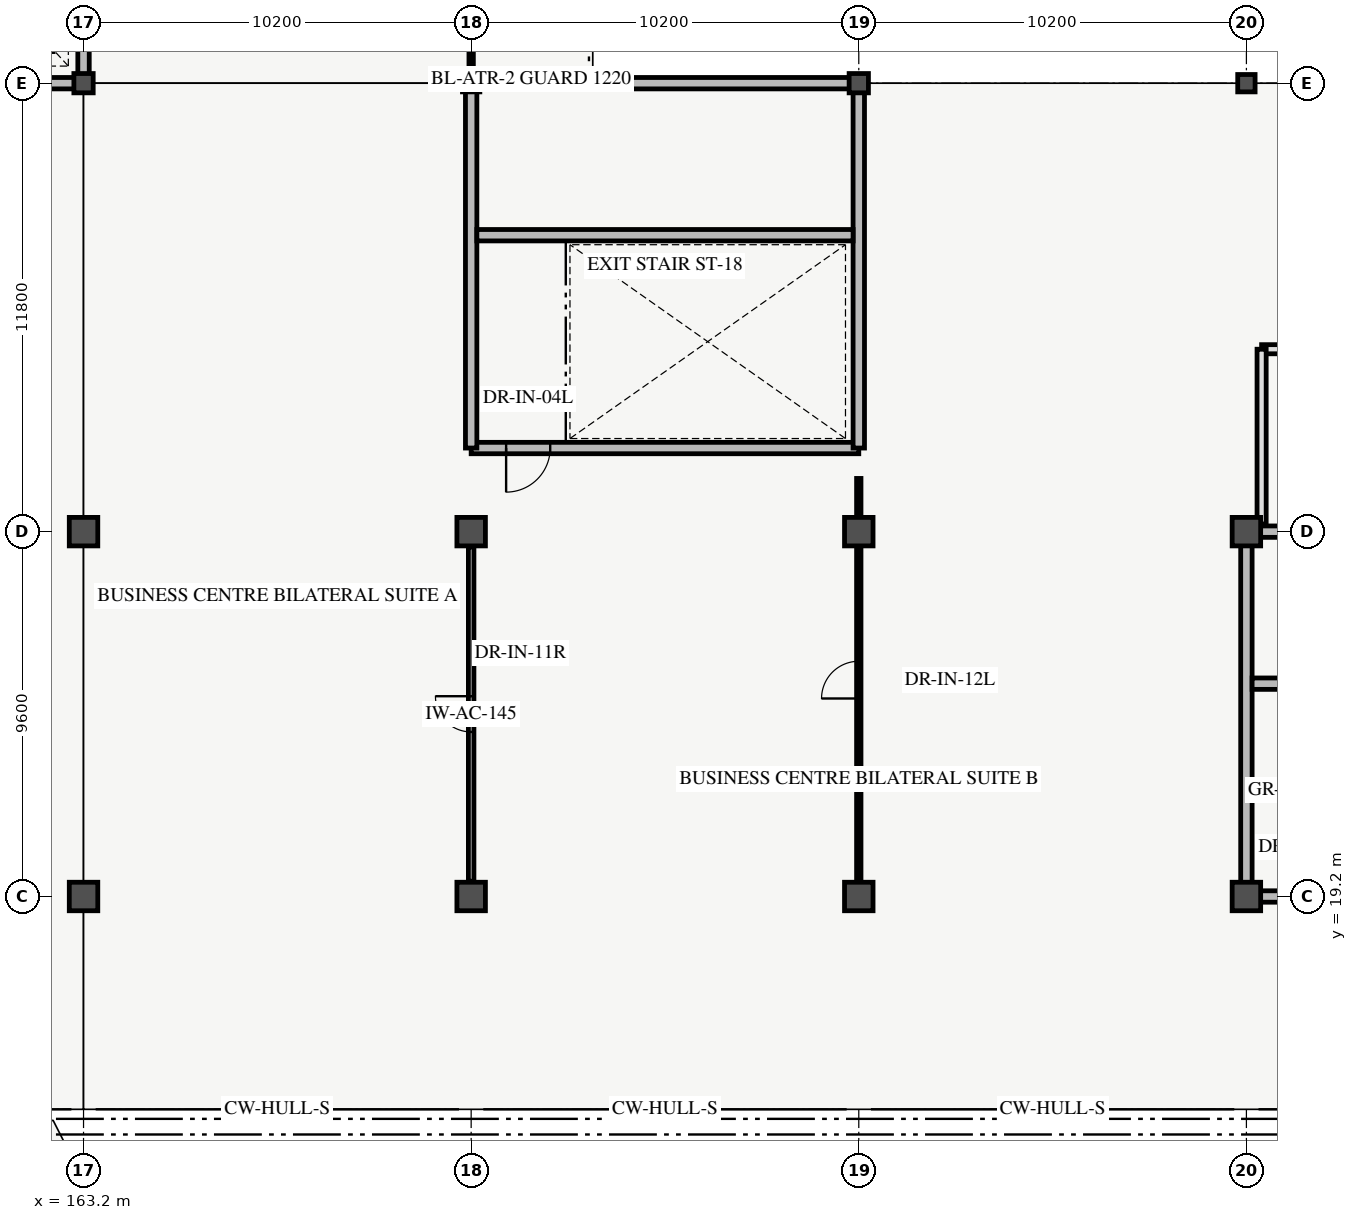
"""IFC4 building model, lengths in metres.
Left out: names, types, materials, properties, quantities, classifications, styles, units other than length and angle.
Written with IfcOpenShell. Run it as: python <this file> out.ifc"""

import sys

from ifc_helpers import new_model, si_unit, direction, frame, frame_2d, origin, origin_2d, place, context, subcontext, project, spatial, rectangle, hollow_circle, extrude, element, fill, save


model = new_model("IFC4")
c1 = context("Model", 3, precision=1e-05, world=origin(), true_north=direction((0.0, 1.0)))
c2 = subcontext(c1, "Body", "Model", "MODEL_VIEW")
j1 = project(units=[si_unit("LENGTHUNIT", "METRE"), si_unit("PLANEANGLEUNIT", "RADIAN")], contexts=[c1])
p1 = place(None, origin())
s1 = spatial("IfcSite", under=j1, at=p1, CompositionType="ELEMENT")
p2 = place(p1, origin())
s2 = spatial("IfcBuilding", under=s1, at=p2, CompositionType="ELEMENT")
p3 = place(p2, frame((0.0, 0.0, 10.8)))
s3 = spatial("IfcBuildingStorey", under=s2, at=p3, CompositionType="ELEMENT", Elevation=10.8)
for number, where, z_axis, x_axis in (
    (1, (163.2, 19.2, 0.0), (0.0, 0.0, 1.0), (1.0, 0.0, 0.0)),
    (2, (163.2, 28.8, 0.0), (0.0, 0.0, 1.0), (1.0, 0.0, 0.0)),
):
    element("IfcColumn", number, at=place(p3, frame(where, z_axis=z_axis, x_axis=x_axis)), inside=s3, PredefinedType="COLUMN", context=c2, shape_type="SweptSolid", body=[
        extrude(rectangle(XDim=0.75, YDim=0.75, at=origin_2d()), origin(), (0.0, 0.0, 1.0), 4.2),
    ])
p4 = place(p3, frame((163.2, 40.6, 0.0), z_axis=(0.0, 0.0, 1.0), x_axis=(1.0, 0.0, 0.0)))
e3 = element("IfcColumn", 3, at=p4, inside=s3, PredefinedType="COLUMN", context=c2, shape_type="SweptSolid", body=[
    extrude(hollow_circle(Radius=0.254, WallThickness=0.02, at=origin_2d()), origin(), (0.0, 0.0, 1.0), 4.2),
])
for number, where, z_axis, x_axis in (
    (4, (173.4, 19.2, 0.0), (0.0, 0.0, 1.0), (1.0, 0.0, 0.0)),
    (5, (173.4, 28.8, 0.0), (0.0, 0.0, 1.0), (1.0, 0.0, 0.0)),
):
    element("IfcColumn", number, at=place(p3, frame(where, z_axis=z_axis, x_axis=x_axis)), inside=s3, PredefinedType="COLUMN", context=c2, shape_type="SweptSolid", body=[
        extrude(rectangle(XDim=0.75, YDim=0.75, at=origin_2d()), origin(), (0.0, 0.0, 1.0), 4.2),
    ])
p5 = place(p3, frame((173.4, 40.6, 0.0), z_axis=(0.0, 0.0, 1.0), x_axis=(1.0, 0.0, 0.0)))
e6 = element("IfcColumn", 6, at=p5, inside=s3, PredefinedType="COLUMN", context=c2, shape_type="SweptSolid", body=[
    extrude(hollow_circle(Radius=0.229, WallThickness=0.02, at=origin_2d()), origin(), (0.0, 0.0, 1.0), 4.2),
])
for number, where, z_axis, x_axis in (
    (7, (183.6, 19.2, 0.0), (0.0, 0.0, 1.0), (1.0, 0.0, 0.0)),
    (8, (183.6, 28.8, 0.0), (0.0, 0.0, 1.0), (1.0, 0.0, 0.0)),
):
    element("IfcColumn", number, at=place(p3, frame(where, z_axis=z_axis, x_axis=x_axis)), inside=s3, PredefinedType="COLUMN", context=c2, shape_type="SweptSolid", body=[
        extrude(rectangle(XDim=0.75, YDim=0.75, at=origin_2d()), origin(), (0.0, 0.0, 1.0), 4.2),
    ])
p6 = place(p3, frame((183.6, 40.6, 0.0), z_axis=(0.0, 0.0, 1.0), x_axis=(1.0, 0.0, 0.0)))
e9 = element("IfcColumn", 9, at=p6, inside=s3, PredefinedType="COLUMN", context=c2, shape_type="SweptSolid", body=[
    extrude(hollow_circle(Radius=0.254, WallThickness=0.02, at=origin_2d()), origin(), (0.0, 0.0, 1.0), 4.2),
])
for number, where, z_axis, x_axis in (
    (10, (193.8, 19.2, 0.0), (0.0, 0.0, 1.0), (1.0, 0.0, 0.0)),
    (11, (193.8, 28.8, 0.0), (0.0, 0.0, 1.0), (1.0, 0.0, 0.0)),
):
    element("IfcColumn", number, at=place(p3, frame(where, z_axis=z_axis, x_axis=x_axis)), inside=s3, PredefinedType="COLUMN", context=c2, shape_type="SweptSolid", body=[
        extrude(rectangle(XDim=0.75, YDim=0.75, at=origin_2d()), origin(), (0.0, 0.0, 1.0), 4.2),
    ])
p7 = place(p3, frame((193.8, 40.6, 0.0), z_axis=(0.0, 0.0, 1.0), x_axis=(1.0, 0.0, 0.0)))
e12 = element("IfcColumn", 12, at=p7, inside=s3, PredefinedType="COLUMN", context=c2, shape_type="SweptSolid", body=[
    extrude(hollow_circle(Radius=0.229, WallThickness=0.02, at=origin_2d()), origin(), (0.0, 0.0, 1.0), 4.2),
])
p8 = place(p3, frame((153.0, 40.6, 0.0), z_axis=(0.0, 0.0, 1.0), x_axis=(1.0, 0.0, 0.0)))
e13 = element("IfcWall", 13, at=p8, inside=s3, PredefinedType="SHEAR", context=c2, shape_type="SweptSolid", body=[
    extrude(rectangle(XDim=10.2, YDim=0.3, at=frame_2d((5.1, 0.0))), origin(), (0.0, 0.0, 1.0), 4.2),
])
p9 = place(p8, frame((7.4, 0.0, 0.0)))
e14 = element("IfcOpeningElement", 14, at=p9, cuts=e13, PredefinedType="OPENING", context=c2, shape_type="SweptSolid", body=[
    extrude(rectangle(XDim=1.2, YDim=2.25, at=frame_2d((0.6, 1.125))), frame((0.0, 0.16, 0.0), z_axis=(0.0, -1.0, 0.0), x_axis=(1.0, 0.0, 0.0)), (0.0, 0.0, 1.0), 0.32),
])
p10 = place(p3, frame((163.2, 40.6, 0.0), z_axis=(0.0, 0.0, 1.0), x_axis=(0.0, 1.0, 0.0)))
e15 = element("IfcWall", 15, at=p10, inside=s3, PredefinedType="SHEAR", context=c2, shape_type="SweptSolid", body=[
    extrude(rectangle(XDim=11.8, YDim=0.3, at=frame_2d((5.9, 0.0))), origin(), (0.0, 0.0, 1.0), 4.2),
])
p11 = place(p3, frame((193.8, 19.2, 0.0), z_axis=(0.0, 0.0, 1.0), x_axis=(1.0, 0.0, 0.0)))
e16 = element("IfcWall", 16, at=p11, inside=s3, PredefinedType="SHEAR", context=c2, shape_type="SweptSolid", body=[
    extrude(rectangle(XDim=10.2, YDim=0.3, at=frame_2d((5.1, 0.0))), origin(), (0.0, 0.0, 1.0), 4.2),
])
p12 = place(p11, frame((0.92, 0.0, 0.0)))
e17 = element("IfcOpeningElement", 17, at=p12, cuts=e16, PredefinedType="OPENING", context=c2, shape_type="SweptSolid", body=[
    extrude(rectangle(XDim=1.16, YDim=2.2, at=frame_2d((0.58, 1.1))), frame((0.0, 0.16, 0.0), z_axis=(0.0, -1.0, 0.0), x_axis=(1.0, 0.0, 0.0)), (0.0, 0.0, 1.0), 0.32),
])
p13 = place(p3, frame((193.8, 28.8, 0.0), z_axis=(0.0, 0.0, 1.0), x_axis=(1.0, 0.0, 0.0)))
e18 = element("IfcWall", 18, at=p13, inside=s3, PredefinedType="SHEAR", context=c2, shape_type="SweptSolid", body=[
    extrude(rectangle(XDim=10.2, YDim=0.3, at=frame_2d((5.1, 0.0))), origin(), (0.0, 0.0, 1.0), 4.2),
])
p14 = place(p13, frame((7.4, 0.0, 0.0)))
e19 = element("IfcOpeningElement", 19, at=p14, cuts=e18, PredefinedType="OPENING", context=c2, shape_type="SweptSolid", body=[
    extrude(rectangle(XDim=1.2, YDim=2.25, at=frame_2d((0.6, 1.125))), frame((0.0, 0.16, 0.0), z_axis=(0.0, -1.0, 0.0), x_axis=(1.0, 0.0, 0.0)), (0.0, 0.0, 1.0), 0.32),
])
p15 = place(p3, frame((193.8, 19.2, 0.0), z_axis=(0.0, 0.0, 1.0), x_axis=(0.0, 1.0, 0.0)))
e20 = element("IfcWall", 20, at=p15, inside=s3, PredefinedType="SHEAR", context=c2, shape_type="SweptSolid", body=[
    extrude(rectangle(XDim=9.6, YDim=0.3, at=frame_2d((4.8, 0.0))), origin(), (0.0, 0.0, 1.0), 4.2),
])
p16 = place(p3, frame((193.95, 24.8, 0.0), z_axis=(0.0, 0.0, 1.0), x_axis=(1.0, 0.0, 0.0)))
e21 = element("IfcWall", 21, at=p16, inside=s3, PredefinedType="SHEAR", context=c2, shape_type="SweptSolid", body=[
    extrude(rectangle(XDim=9.9, YDim=0.3, at=frame_2d((4.95, 0.0))), origin(), (0.0, 0.0, 1.0), 4.2),
])
p17 = place(p3, frame((173.4, 31.0, 0.0), z_axis=(0.0, 0.0, 1.0), x_axis=(1.0, 0.0, 0.0)))
e22 = element("IfcWall", 22, at=p17, inside=s3, PredefinedType="SHEAR", context=c2, shape_type="SweptSolid", body=[
    extrude(rectangle(XDim=10.2, YDim=0.3, at=frame_2d((5.1, 0.0))), origin(), (0.0, 0.0, 1.0), 4.2),
])
p18 = place(p17, frame((0.92, 0.0, 0.0)))
e23 = element("IfcOpeningElement", 23, at=p18, cuts=e22, PredefinedType="OPENING", context=c2, shape_type="SweptSolid", body=[
    extrude(rectangle(XDim=1.16, YDim=2.2, at=frame_2d((0.58, 1.1))), frame((0.0, 0.16, 0.0), z_axis=(0.0, -1.0, 0.0), x_axis=(1.0, 0.0, 0.0)), (0.0, 0.0, 1.0), 0.32),
])
p19 = place(p3, frame((173.4, 40.6, 0.0), z_axis=(0.0, 0.0, 1.0), x_axis=(1.0, 0.0, 0.0)))
e24 = element("IfcWall", 24, at=p19, inside=s3, PredefinedType="SHEAR", context=c2, shape_type="SweptSolid", body=[
    extrude(rectangle(XDim=10.2, YDim=0.3, at=frame_2d((5.1, 0.0))), origin(), (0.0, 0.0, 1.0), 4.2),
])
for number, where, z_axis, x_axis in (
    (25, (173.4, 31.0, 0.0), (0.0, 0.0, 1.0), (0.0, 1.0, 0.0)),
    (26, (183.6, 31.0, 0.0), (0.0, 0.0, 1.0), (0.0, 1.0, 0.0)),
):
    element("IfcWall", number, at=place(p3, frame(where, z_axis=z_axis, x_axis=x_axis)), inside=s3, PredefinedType="SHEAR", context=c2, shape_type="SweptSolid", body=[
        extrude(rectangle(XDim=9.6, YDim=0.3, at=frame_2d((4.8, 0.0))), origin(), (0.0, 0.0, 1.0), 4.2),
    ])
p20 = place(p3, frame((173.55, 36.6, 0.0), z_axis=(0.0, 0.0, 1.0), x_axis=(1.0, 0.0, 0.0)))
e27 = element("IfcWall", 27, at=p20, inside=s3, PredefinedType="SHEAR", context=c2, shape_type="SweptSolid", body=[
    extrude(rectangle(XDim=9.9, YDim=0.3, at=frame_2d((4.95, 0.0))), origin(), (0.0, 0.0, 1.0), 4.2),
])
p21 = place(p3, frame((194.2, 33.6, 0.0), z_axis=(0.0, 0.0, 1.0), x_axis=(1.0, 0.0, 0.0)))
e28 = element("IfcWall", 28, at=p21, inside=s3, PredefinedType="PARTITIONING", context=c2, shape_type="SweptSolid", body=[
    extrude(rectangle(XDim=9.4, YDim=0.24, at=frame_2d((4.7, 0.0))), origin(), (0.0, 0.0, 1.0), 3.06),
])
p22 = place(p21, frame((3.75, 0.0, 0.0)))
e29 = element("IfcOpeningElement", 29, at=p22, cuts=e28, PredefinedType="OPENING", context=c2, shape_type="SweptSolid", body=[
    extrude(rectangle(XDim=1.9, YDim=2.25, at=frame_2d((0.95, 1.125))), frame((0.0, 0.13, 0.0), z_axis=(0.0, -1.0, 0.0), x_axis=(1.0, 0.0, 0.0)), (0.0, 0.0, 1.0), 0.26),
])
p23 = place(p3, frame((194.2, 29.0, 0.0), z_axis=(0.0, 0.0, 1.0), x_axis=(0.0, 1.0, 0.0)))
e30 = element("IfcWall", 30, at=p23, inside=s3, PredefinedType="PARTITIONING", context=c2, shape_type="SweptSolid", body=[
    extrude(rectangle(XDim=4.6, YDim=0.24, at=frame_2d((2.3, 0.0))), origin(), (0.0, 0.0, 1.0), 3.06),
])
p24 = place(p3, frame((173.4, 41.0, 0.0), z_axis=(0.0, 0.0, 1.0), x_axis=(0.0, 1.0, 0.0)))
e31 = element("IfcWall", 31, at=p24, inside=s3, PredefinedType="PARTITIONING", context=c2, shape_type="SweptSolid", body=[
    extrude(rectangle(XDim=11.0, YDim=0.115, at=frame_2d((5.5, 0.0))), origin(), (0.0, 0.0, 1.0), 3.06),
])
p25 = place(p24, frame((4.3, 0.0, 0.0)))
e32 = element("IfcOpeningElement", 32, at=p25, cuts=e31, PredefinedType="OPENING", context=c2, shape_type="SweptSolid", body=[
    extrude(rectangle(XDim=2.4, YDim=2.4, at=frame_2d((1.2, 1.2))), frame((0.0, 0.067, 0.0), z_axis=(0.0, -1.0, 0.0), x_axis=(1.0, 0.0, 0.0)), (0.0, 0.0, 1.0), 0.135),
])
p26 = place(p3, frame((173.4, 19.6, 0.0), z_axis=(0.0, 0.0, 1.0), x_axis=(0.0, 1.0, 0.0)))
e33 = element("IfcWall", 33, at=p26, inside=s3, PredefinedType="PARTITIONING", context=c2, shape_type="SweptSolid", body=[
    extrude(rectangle(XDim=8.8, YDim=0.145, at=frame_2d((4.4, 0.0))), origin(), (0.0, 0.0, 1.0), 3.06),
])
p27 = place(p26, frame((3.93, 0.0, 0.0)))
e34 = element("IfcOpeningElement", 34, at=p27, cuts=e33, PredefinedType="OPENING", context=c2, shape_type="SweptSolid", body=[
    extrude(rectangle(XDim=0.94, YDim=2.08, at=frame_2d((0.47, 1.04))), frame((0.0, 0.083, 0.0), z_axis=(0.0, -1.0, 0.0), x_axis=(1.0, 0.0, 0.0)), (0.0, 0.0, 1.0), 0.165),
])
p28 = place(p3, frame((183.6, 19.6, 0.0), z_axis=(0.0, 0.0, 1.0), x_axis=(0.0, 1.0, 0.0)))
e35 = element("IfcWall", 35, at=p28, inside=s3, PredefinedType="PARTITIONING", context=c2, shape_type="SweptSolid", body=[
    extrude(rectangle(XDim=10.6, YDim=0.115, at=frame_2d((5.3, 0.0))), origin(), (0.0, 0.0, 1.0), 3.06),
])
p29 = place(p28, frame((4.81, 0.0, 0.0)))
e36 = element("IfcOpeningElement", 36, at=p29, cuts=e35, PredefinedType="OPENING", context=c2, shape_type="SweptSolid", body=[
    extrude(rectangle(XDim=0.98, YDim=2.12, at=frame_2d((0.49, 1.06))), frame((0.0, 0.067, 0.0), z_axis=(0.0, -1.0, 0.0), x_axis=(1.0, 0.0, 0.0)), (0.0, 0.0, 1.0), 0.135),
])
p30 = place(p18, origin())
e37 = element("IfcDoor", 37, at=p30, inside=s3, OperationType="SINGLE_SWING_LEFT", PredefinedType="DOOR", context=c2, shape_type="SweptSolid", body=[
    extrude(rectangle(XDim=1.16, YDim=2.2, at=frame_2d((0.58, 1.1))), frame((0.0, 0.025, 0.0), z_axis=(0.0, -1.0, 0.0), x_axis=(1.0, 0.0, 0.0)), (0.0, 0.0, 1.0), 0.05),
])
fill(e23, e37)
p31 = place(p27, origin())
e38 = element("IfcDoor", 38, at=p31, inside=s3, OperationType="SINGLE_SWING_RIGHT", PredefinedType="DOOR", context=c2, shape_type="SweptSolid", body=[
    extrude(rectangle(XDim=0.94, YDim=2.08, at=frame_2d((0.47, 1.04))), frame((0.0, 0.025, 0.0), z_axis=(0.0, -1.0, 0.0), x_axis=(1.0, 0.0, 0.0)), (0.0, 0.0, 1.0), 0.05),
])
fill(e34, e38)
p32 = place(p29, origin())
e39 = element("IfcDoor", 39, at=p32, inside=s3, OperationType="SINGLE_SWING_LEFT", PredefinedType="DOOR", context=c2, shape_type="SweptSolid", body=[
    extrude(rectangle(XDim=0.98, YDim=2.12, at=frame_2d((0.49, 1.06))), frame((0.0, 0.025, 0.0), z_axis=(0.0, -1.0, 0.0), x_axis=(1.0, 0.0, 0.0)), (0.0, 0.0, 1.0), 0.05),
])
fill(e36, e39)
save(model, sys.argv[1])
